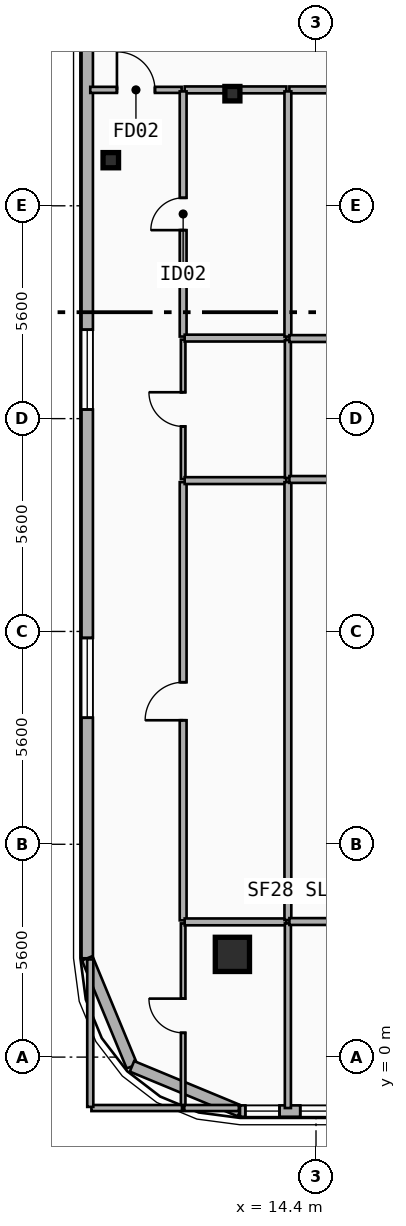
"""IFC4 building model, lengths in metres.
Left out: names, types, materials, properties, quantities, classifications, styles, units other than length and angle.
Written with IfcOpenShell. Run it as: python <this file> out.ifc"""

import sys

from ifc_helpers import new_model, si_unit, direction, frame, frame_2d, origin, origin_2d, place, context, subcontext, project, spatial, rectangle, i_section, extrude, element, fill, save


model = new_model("IFC4")
c1 = context("Model", 3, precision=1e-05, world=origin(), true_north=direction((0.0, 1.0)))
c2 = subcontext(c1, "Body", "Model", "MODEL_VIEW")
j1 = project(units=[si_unit("LENGTHUNIT", "METRE"), si_unit("PLANEANGLEUNIT", "RADIAN")], contexts=[c1])
p1 = place(None, origin())
s1 = spatial("IfcSite", under=j1, at=p1, CompositionType="ELEMENT")
p2 = place(p1, origin())
s2 = spatial("IfcBuilding", under=s1, at=p2, CompositionType="ELEMENT")
p3 = place(p2, frame((0.0, 0.0, 258.4)))
s3 = spatial("IfcBuildingStorey", under=s2, at=p3, CompositionType="ELEMENT", Elevation=258.4)
p4 = place(p3, frame((12.2, 25.35, 0.0), z_axis=(0.0, 0.0, 1.0), x_axis=(1.0, 0.0, 0.0)))
e1 = element("IfcColumn", 1, at=p4, inside=s3, PredefinedType="COLUMN", context=c2, shape_type="SweptSolid", body=[
    extrude(i_section(OverallWidth=0.395, OverallDepth=0.38, WebThickness=0.019, FlangeThickness=0.03, FilletRadius=0.015, at=origin_2d()), origin(), (0.0, 0.0, 1.0), 3.7),
])
p5 = place(p3, frame((12.2, 2.812, 0.0), z_axis=(0.0, -0.090221727315, 0.99592170371), x_axis=(1.0, 0.0, 0.0)))
e2 = element("IfcColumn", 2, at=p5, inside=s3, PredefinedType="COLUMN", context=c2, shape_type="SweptSolid", body=[
    extrude(rectangle(XDim=0.9, YDim=0.9, at=origin_2d()), origin(), (0.0, 0.0, 1.0), 3.715),
])
p6 = place(p3, frame((9.0, 23.6, 0.0), z_axis=(0.0, 0.0, 1.0), x_axis=(1.0, 0.0, 0.0)))
e3 = element("IfcColumn", 3, at=p6, inside=s3, PredefinedType="COLUMN", context=c2, shape_type="SweptSolid", body=[
    extrude(i_section(OverallWidth=0.408, OverallDepth=0.4, WebThickness=0.025, FlangeThickness=0.039, FilletRadius=0.015, at=origin_2d()), origin(), (0.0, 0.0, 1.0), 3.7),
])
p7 = place(p3, frame((8.38, 2.6, 0.0), z_axis=(0.0, 0.0, 1.0), x_axis=(0.0, 1.0, 0.0)))
e4 = element("IfcWall", 4, at=p7, inside=s3, PredefinedType="SOLIDWALL", context=c2, shape_type="SweptSolid", body=[
    extrude(rectangle(XDim=34.2, YDim=0.3, at=frame_2d((17.1, 0.0))), origin(), (0.0, 0.0, 1.0), 3.42),
])
p8 = place(p7, frame((6.33, 0.0, 0.75)))
e5 = element("IfcOpeningElement", 5, at=p8, cuts=e4, PredefinedType="OPENING", context=c2, shape_type="SweptSolid", body=[
    extrude(rectangle(XDim=2.1, YDim=2.1, at=frame_2d((1.05, 1.05))), frame((0.0, 0.16, 0.0), z_axis=(0.0, -1.0, 0.0), x_axis=(1.0, 0.0, 0.0)), (0.0, 0.0, 1.0), 0.32),
])
p9 = place(p7, frame((14.44, 0.0, 0.75)))
e6 = element("IfcOpeningElement", 6, at=p9, cuts=e4, PredefinedType="OPENING", context=c2, shape_type="SweptSolid", body=[
    extrude(rectangle(XDim=2.1, YDim=2.1, at=frame_2d((1.05, 1.05))), frame((0.0, 0.16, 0.0), z_axis=(0.0, -1.0, 0.0), x_axis=(1.0, 0.0, 0.0)), (0.0, 0.0, 1.0), 0.32),
])
p10 = place(p3, frame((9.557, -0.243, 0.0), z_axis=(0.0, 0.0, 1.0), x_axis=(-0.382676475685, 0.923882414032, 0.0)))
e7 = element("IfcWall", 7, at=p10, inside=s3, PredefinedType="SOLIDWALL", context=c2, shape_type="SweptSolid", body=[
    extrude(rectangle(XDim=3.077, YDim=0.3, at=frame_2d((1.539, 0.0))), origin(), (0.0, 0.0, 1.0), 3.42),
])
p11 = place(p3, frame((12.4, -1.42, 0.0), z_axis=(0.0, 0.0, 1.0), x_axis=(-0.92389884758, 0.382636798336, 0.0)))
e8 = element("IfcWall", 8, at=p11, inside=s3, PredefinedType="SOLIDWALL", context=c2, shape_type="SweptSolid", body=[
    extrude(rectangle(XDim=3.077, YDim=0.3, at=frame_2d((1.538, 0.0))), origin(), (0.0, 0.0, 1.0), 3.42),
])
p12 = place(p3, frame((45.2, -1.42, 0.0), z_axis=(0.0, 0.0, 1.0), x_axis=(-1.0, 0.0, 0.0)))
e9 = element("IfcWall", 9, at=p12, inside=s3, PredefinedType="SOLIDWALL", context=c2, shape_type="SweptSolid", body=[
    extrude(rectangle(XDim=32.8, YDim=0.3, at=frame_2d((16.4, 0.0))), origin(), (0.0, 0.0, 1.0), 3.42),
])
p13 = place(p12, frame((26.77, 0.0, 0.75)))
e10 = element("IfcOpeningElement", 10, at=p13, cuts=e9, PredefinedType="OPENING", context=c2, shape_type="SweptSolid", body=[
    extrude(rectangle(XDim=1.6, YDim=1.95, at=frame_2d((0.8, 0.975))), frame((0.0, 0.16, 0.0), z_axis=(0.0, -1.0, 0.0), x_axis=(1.0, 0.0, 0.0)), (0.0, 0.0, 1.0), 0.32),
])
p14 = place(p12, frame((29.115, 0.0, 0.75)))
e11 = element("IfcOpeningElement", 11, at=p14, cuts=e9, PredefinedType="OPENING", context=c2, shape_type="SweptSolid", body=[
    extrude(rectangle(XDim=2.1, YDim=2.1, at=frame_2d((1.05, 1.05))), frame((0.0, 0.16, 0.0), z_axis=(0.0, -1.0, 0.0), x_axis=(1.0, 0.0, 0.0)), (0.0, 0.0, 1.0), 0.32),
])
p15 = place(p12, frame((15.75, 0.0, 0.75)))
e12 = element("IfcOpeningElement", 12, at=p15, cuts=e9, PredefinedType="OPENING", context=c2, shape_type="SweptSolid", body=[
    extrude(rectangle(XDim=2.1, YDim=2.1, at=frame_2d((1.05, 1.05))), frame((0.0, 0.16, 0.0), z_axis=(0.0, -1.0, 0.0), x_axis=(1.0, 0.0, 0.0)), (0.0, 0.0, 1.0), 0.32),
])
p16 = place(p12, frame((4.681, 0.0, 0.8)))
e13 = element("IfcOpeningElement", 13, at=p16, cuts=e9, PredefinedType="OPENING", context=c2, shape_type="SweptSolid", body=[
    extrude(rectangle(XDim=1.8, YDim=1.8, at=frame_2d((0.9, 0.9))), frame((0.0, 0.16, 0.0), z_axis=(0.0, -1.0, 0.0), x_axis=(1.0, 0.0, 0.0)), (0.0, 0.0, 1.0), 0.32),
])
p17 = place(p12, frame((1.831, 0.0, 0.75)))
e14 = element("IfcOpeningElement", 14, at=p17, cuts=e9, PredefinedType="OPENING", context=c2, shape_type="SweptSolid", body=[
    extrude(rectangle(XDim=2.1, YDim=2.1, at=frame_2d((1.05, 1.05))), frame((0.0, 0.16, 0.0), z_axis=(0.0, -1.0, 0.0), x_axis=(1.0, 0.0, 0.0)), (0.0, 0.0, 1.0), 0.32),
])
p18 = place(p12, frame((0.2, 0.0, 0.9)))
e15 = element("IfcOpeningElement", 15, at=p18, cuts=e9, PredefinedType="OPENING", context=c2, shape_type="SweptSolid", body=[
    extrude(rectangle(XDim=0.9, YDim=1.05, at=frame_2d((0.45, 0.525))), frame((0.0, 0.16, 0.0), z_axis=(0.0, -1.0, 0.0), x_axis=(1.0, 0.0, 0.0)), (0.0, 0.0, 1.0), 0.32),
])
p19 = place(p12, frame((31.76, 0.0, 0.9)))
e16 = element("IfcOpeningElement", 16, at=p19, cuts=e9, PredefinedType="OPENING", context=c2, shape_type="SweptSolid", body=[
    extrude(rectangle(XDim=0.9, YDim=1.05, at=frame_2d((0.45, 0.525))), frame((0.0, 0.16, 0.0), z_axis=(0.0, -1.0, 0.0), x_axis=(1.0, 0.0, 0.0)), (0.0, 0.0, 1.0), 0.32),
])
p20 = place(p3, frame((8.46, 25.45, 0.0), z_axis=(0.0, 0.0, 1.0), x_axis=(1.0, 0.0, 0.0)))
e17 = element("IfcWall", 17, at=p20, inside=s3, PredefinedType="PARTITIONING", context=c2, shape_type="SweptSolid", body=[
    extrude(rectangle(XDim=2.404, YDim=0.16, at=frame_2d((1.202, 0.0))), origin(), (0.0, 0.0, 1.0), 3.42),
])
p21 = place(p20, frame((0.702, 0.0, 0.0)))
e18 = element("IfcOpeningElement", 18, at=p21, cuts=e17, PredefinedType="OPENING", context=c2, shape_type="SweptSolid", body=[
    extrude(rectangle(XDim=1.0, YDim=2.15, at=frame_2d((0.5, 1.075))), frame((0.0, 0.09, 0.0), z_axis=(0.0, -1.0, 0.0), x_axis=(1.0, 0.0, 0.0)), (0.0, 0.0, 1.0), 0.18),
])
p22 = place(p3, frame((10.944, 25.45, 0.0), z_axis=(0.0, 0.0, 1.0), x_axis=(1.0, 0.0, 0.0)))
e19 = element("IfcWall", 19, at=p22, inside=s3, PredefinedType="PLUMBINGWALL", context=c2, shape_type="SweptSolid", body=[
    extrude(rectangle(XDim=2.676, YDim=0.18, at=frame_2d((1.338, 0.0))), origin(), (0.0, 0.0, 1.0), 2.7),
])
p23 = place(p3, frame((13.7, 25.45, 0.0), z_axis=(0.0, 0.0, 1.0), x_axis=(1.0, 0.0, 0.0)))
e20 = element("IfcWall", 20, at=p23, inside=s3, PredefinedType="PLUMBINGWALL", context=c2, shape_type="SweptSolid", body=[
    extrude(rectangle(XDim=2.671, YDim=0.18, at=frame_2d((1.335, 0.0))), origin(), (0.0, 0.0, 1.0), 3.42),
])
p24 = place(p3, frame((10.904, -1.34, 0.0), z_axis=(0.0, 0.0, 1.0), x_axis=(0.0, 1.0, 0.0)))
e21 = element("IfcWall", 21, at=p24, inside=s3, PredefinedType="PARTITIONING", context=c2, shape_type="SweptSolid", body=[
    extrude(rectangle(XDim=4.858, YDim=0.12, at=frame_2d((2.429, 0.0))), origin(), (0.0, 0.0, 1.0), 3.42),
])
p25 = place(p24, frame((1.979, 0.0, 0.0)))
e22 = element("IfcOpeningElement", 22, at=p25, cuts=e21, PredefinedType="OPENING", context=c2, shape_type="SweptSolid", body=[
    extrude(rectangle(XDim=0.9, YDim=2.1, at=frame_2d((0.45, 1.05))), frame((0.0, 0.07, 0.0), z_axis=(0.0, -1.0, 0.0), x_axis=(1.0, 0.0, 0.0)), (0.0, 0.0, 1.0), 0.14),
])
p26 = place(p3, frame((10.904, 3.598, 0.0), z_axis=(0.0, 0.0, 1.0), x_axis=(0.0, 1.0, 0.0)))
e23 = element("IfcWall", 23, at=p26, inside=s3, PredefinedType="PLUMBINGWALL", context=c2, shape_type="SweptSolid", body=[
    extrude(rectangle(XDim=11.531, YDim=0.18, at=frame_2d((5.766, 0.0))), origin(), (0.0, 0.0, 1.0), 3.42),
])
p27 = place(p26, frame((5.265, 0.0, 0.0)))
e24 = element("IfcOpeningElement", 24, at=p27, cuts=e23, PredefinedType="OPENING", context=c2, shape_type="SweptSolid", body=[
    extrude(rectangle(XDim=1.0, YDim=2.15, at=frame_2d((0.5, 1.075))), frame((0.0, 0.1, 0.0), z_axis=(0.0, -1.0, 0.0), x_axis=(1.0, 0.0, 0.0)), (0.0, 0.0, 1.0), 0.2),
])
p28 = place(p3, frame((10.904, 15.209, 0.0), z_axis=(0.0, 0.0, 1.0), x_axis=(0.0, 1.0, 0.0)))
e25 = element("IfcWall", 25, at=p28, inside=s3, PredefinedType="PARTITIONING", context=c2, shape_type="SweptSolid", body=[
    extrude(rectangle(XDim=3.67, YDim=0.12, at=frame_2d((1.835, 0.0))), origin(), (0.0, 0.0, 1.0), 3.42),
])
p29 = place(p28, frame((1.385, 0.0, 0.0)))
e26 = element("IfcOpeningElement", 26, at=p29, cuts=e25, PredefinedType="OPENING", context=c2, shape_type="SweptSolid", body=[
    extrude(rectangle(XDim=0.9, YDim=2.1, at=frame_2d((0.45, 1.05))), frame((0.0, 0.07, 0.0), z_axis=(0.0, -1.0, 0.0), x_axis=(1.0, 0.0, 0.0)), (0.0, 0.0, 1.0), 0.14),
])
p30 = place(p3, frame((10.904, 18.959, 0.0), z_axis=(0.0, 0.0, 1.0), x_axis=(0.0, 1.0, 0.0)))
e27 = element("IfcWall", 27, at=p30, inside=s3, PredefinedType="PLUMBINGWALL", context=c2, shape_type="SweptSolid", body=[
    extrude(rectangle(XDim=6.451, YDim=0.18, at=frame_2d((3.226, 0.0))), origin(), (0.0, 0.0, 1.0), 2.9),
])
p31 = place(p30, frame((2.801, 0.0, 0.0)))
e28 = element("IfcOpeningElement", 28, at=p31, cuts=e27, PredefinedType="OPENING", context=c2, shape_type="SweptSolid", body=[
    extrude(rectangle(XDim=0.85, YDim=2.1, at=frame_2d((0.425, 1.05))), frame((0.0, 0.1, 0.0), z_axis=(0.0, -1.0, 0.0), x_axis=(1.0, 0.0, 0.0)), (0.0, 0.0, 1.0), 0.2),
])
p32 = place(p3, frame((10.944, 3.558, 0.0), z_axis=(0.0, 0.0, 1.0), x_axis=(1.0, 0.0, 0.0)))
e29 = element("IfcWall", 29, at=p32, inside=s3, PredefinedType="PLUMBINGWALL", context=c2, shape_type="SweptSolid", body=[
    extrude(rectangle(XDim=2.676, YDim=0.18, at=frame_2d((1.338, 0.0))), origin(), (0.0, 0.0, 1.0), 2.7),
])
p33 = place(p3, frame((13.66, -1.34, 0.0), z_axis=(0.0, 0.0, 1.0), x_axis=(0.0, 1.0, 0.0)))
e30 = element("IfcWall", 30, at=p33, inside=s3, PredefinedType="PARTITIONING", context=c2, shape_type="SweptSolid", body=[
    extrude(rectangle(XDim=4.858, YDim=0.16, at=frame_2d((2.429, 0.0))), origin(), (0.0, 0.0, 1.0), 3.08),
])
p34 = place(p3, frame((10.944, 15.169, 0.0), z_axis=(0.0, 0.0, 1.0), x_axis=(1.0, 0.0, 0.0)))
e31 = element("IfcWall", 31, at=p34, inside=s3, PredefinedType="PLUMBINGWALL", context=c2, shape_type="SweptSolid", body=[
    extrude(rectangle(XDim=2.676, YDim=0.18, at=frame_2d((1.338, 0.0))), origin(), (0.0, 0.0, 1.0), 2.7),
])
p35 = place(p3, frame((13.66, 3.607, 0.0), z_axis=(0.0, 0.0, 1.0), x_axis=(0.0, 1.0, 0.0)))
e32 = element("IfcWall", 32, at=p35, inside=s3, PredefinedType="PLUMBINGWALL", context=c2, shape_type="SweptSolid", body=[
    extrude(rectangle(XDim=11.522, YDim=0.18, at=frame_2d((5.761, 0.0))), origin(), (0.0, 0.0, 1.0), 2.95),
])
p36 = place(p3, frame((10.944, 18.919, 0.0), z_axis=(0.0, 0.0, 1.0), x_axis=(1.0, 0.0, 0.0)))
e33 = element("IfcWall", 33, at=p36, inside=s3, PredefinedType="PLUMBINGWALL", context=c2, shape_type="SweptSolid", body=[
    extrude(rectangle(XDim=2.676, YDim=0.18, at=frame_2d((1.338, 0.0))), origin(), (0.0, 0.0, 1.0), 2.7),
])
p37 = place(p3, frame((13.66, 15.239, 0.0), z_axis=(0.0, 0.0, 1.0), x_axis=(0.0, 1.0, 0.0)))
e34 = element("IfcWall", 34, at=p37, inside=s3, PredefinedType="PARTITIONING", context=c2, shape_type="SweptSolid", body=[
    extrude(rectangle(XDim=3.628, YDim=0.16, at=frame_2d((1.814, 0.0))), origin(), (0.0, 0.0, 1.0), 2.95),
])
p38 = place(p3, frame((13.66, 18.959, 0.0), z_axis=(0.0, 0.0, 1.0), x_axis=(0.0, 1.0, 0.0)))
e35 = element("IfcWall", 35, at=p38, inside=s3, PredefinedType="PLUMBINGWALL", context=c2, shape_type="SweptSolid", body=[
    extrude(rectangle(XDim=6.451, YDim=0.18, at=frame_2d((3.226, 0.0))), origin(), (0.0, 0.0, 1.0), 2.95),
])
p39 = place(p3, frame((13.7, 3.567, 0.0), z_axis=(0.0, 0.0, 1.0), x_axis=(1.0, 0.0, 0.0)))
e36 = element("IfcWall", 36, at=p39, inside=s3, PredefinedType="PLUMBINGWALL", context=c2, shape_type="SweptSolid", body=[
    extrude(rectangle(XDim=2.671, YDim=0.18, at=frame_2d((1.335, 0.0))), origin(), (0.0, 0.0, 1.0), 3.42),
])
p40 = place(p3, frame((13.7, 15.199, 0.0), z_axis=(0.0, 0.0, 1.0), x_axis=(1.0, 0.0, 0.0)))
e37 = element("IfcWall", 37, at=p40, inside=s3, PredefinedType="PLUMBINGWALL", context=c2, shape_type="SweptSolid", body=[
    extrude(rectangle(XDim=2.671, YDim=0.18, at=frame_2d((1.335, 0.0))), origin(), (0.0, 0.0, 1.0), 2.95),
])
p41 = place(p3, frame((13.7, 18.907, 0.0), z_axis=(0.0, 0.0, 1.0), x_axis=(1.0, 0.0, 0.0)))
e38 = element("IfcWall", 38, at=p41, inside=s3, PredefinedType="PLUMBINGWALL", context=c2, shape_type="SweptSolid", body=[
    extrude(rectangle(XDim=2.671, YDim=0.18, at=frame_2d((1.335, 0.0))), origin(), (0.0, 0.0, 1.0), 2.96),
])
p42 = place(p3, frame((8.49, -1.34, 0.0), z_axis=(0.0, 0.0, 1.0), x_axis=(1.0, 0.0, 0.0)))
e39 = element("IfcWall", 39, at=p42, inside=s3, PredefinedType="PARTITIONING", context=c2, shape_type="SweptSolid", body=[
    extrude(rectangle(XDim=2.384, YDim=0.16, at=frame_2d((1.192, 0.0))), origin(), (0.0, 0.0, 1.0), 3.42),
])
p43 = place(p3, frame((8.46, -1.31, 0.0), z_axis=(0.0, 0.0, 1.0), x_axis=(0.0, 1.0, 0.0)))
e40 = element("IfcWall", 40, at=p43, inside=s3, PredefinedType="PARTITIONING", context=c2, shape_type="SweptSolid", body=[
    extrude(rectangle(XDim=3.88, YDim=0.16, at=frame_2d((1.94, 0.0))), origin(), (0.0, 0.0, 1.0), 3.42),
])
p44 = place(p3, frame((10.934, -1.34, 0.0), z_axis=(0.0, 0.0, 1.0), x_axis=(1.0, 0.0, 0.0)))
e41 = element("IfcWall", 41, at=p44, inside=s3, PredefinedType="PARTITIONING", context=c2, shape_type="SweptSolid", body=[
    extrude(rectangle(XDim=1.436, YDim=0.16, at=frame_2d((0.718, 0.0))), origin(), (0.0, 0.0, 1.0), 3.42),
])
p45 = place(p8, origin())
e42 = element("IfcWindow", 42, at=p45, inside=s3, PartitioningType="SINGLE_PANEL", PredefinedType="WINDOW", context=c2, shape_type="SweptSolid", body=[
    extrude(rectangle(XDim=2.1, YDim=2.1, at=frame_2d((1.05, 1.05))), frame((0.0, 0.03, 0.0), z_axis=(0.0, -1.0, 0.0), x_axis=(1.0, 0.0, 0.0)), (0.0, 0.0, 1.0), 0.06),
])
fill(e5, e42)
p46 = place(p9, origin())
e43 = element("IfcWindow", 43, at=p46, inside=s3, PartitioningType="SINGLE_PANEL", PredefinedType="WINDOW", context=c2, shape_type="SweptSolid", body=[
    extrude(rectangle(XDim=2.1, YDim=2.1, at=frame_2d((1.05, 1.05))), frame((0.0, 0.03, 0.0), z_axis=(0.0, -1.0, 0.0), x_axis=(1.0, 0.0, 0.0)), (0.0, 0.0, 1.0), 0.06),
])
fill(e6, e43)
p47 = place(p14, origin())
e44 = element("IfcWindow", 44, at=p47, inside=s3, PartitioningType="SINGLE_PANEL", PredefinedType="WINDOW", context=c2, shape_type="SweptSolid", body=[
    extrude(rectangle(XDim=2.1, YDim=2.1, at=frame_2d((1.05, 1.05))), frame((0.0, 0.03, 0.0), z_axis=(0.0, -1.0, 0.0), x_axis=(1.0, 0.0, 0.0)), (0.0, 0.0, 1.0), 0.06),
])
fill(e11, e44)
p48 = place(p19, origin())
e45 = element("IfcWindow", 45, at=p48, inside=s3, PartitioningType="SINGLE_PANEL", PredefinedType="WINDOW", context=c2, shape_type="SweptSolid", body=[
    extrude(rectangle(XDim=0.9, YDim=1.05, at=frame_2d((0.45, 0.525))), frame((0.0, 0.03, 0.0), z_axis=(0.0, -1.0, 0.0), x_axis=(1.0, 0.0, 0.0)), (0.0, 0.0, 1.0), 0.06),
])
fill(e16, e45)
p49 = place(p21, origin())
e46 = element("IfcDoor", 46, at=p49, inside=s3, OperationType="SINGLE_SWING_LEFT", PredefinedType="DOOR", context=c2, shape_type="SweptSolid", body=[
    extrude(rectangle(XDim=1.0, YDim=2.15, at=frame_2d((0.5, 1.075))), frame((0.0, 0.025, 0.0), z_axis=(0.0, -1.0, 0.0), x_axis=(1.0, 0.0, 0.0)), (0.0, 0.0, 1.0), 0.05),
])
fill(e18, e46)
p50 = place(p25, origin())
e47 = element("IfcDoor", 47, at=p50, inside=s3, OperationType="SINGLE_SWING_RIGHT", PredefinedType="DOOR", context=c2, shape_type="SweptSolid", body=[
    extrude(rectangle(XDim=0.9, YDim=2.1, at=frame_2d((0.45, 1.05))), frame((0.0, 0.025, 0.0), z_axis=(0.0, -1.0, 0.0), x_axis=(1.0, 0.0, 0.0)), (0.0, 0.0, 1.0), 0.05),
])
fill(e22, e47)
p51 = place(p27, origin())
e48 = element("IfcDoor", 48, at=p51, inside=s3, OperationType="SINGLE_SWING_LEFT", PredefinedType="DOOR", context=c2, shape_type="SweptSolid", body=[
    extrude(rectangle(XDim=1.0, YDim=2.15, at=frame_2d((0.5, 1.075))), frame((0.0, 0.025, 0.0), z_axis=(0.0, -1.0, 0.0), x_axis=(1.0, 0.0, 0.0)), (0.0, 0.0, 1.0), 0.05),
])
fill(e24, e48)
p52 = place(p29, origin())
e49 = element("IfcDoor", 49, at=p52, inside=s3, OperationType="SINGLE_SWING_RIGHT", PredefinedType="DOOR", context=c2, shape_type="SweptSolid", body=[
    extrude(rectangle(XDim=0.9, YDim=2.1, at=frame_2d((0.45, 1.05))), frame((0.0, 0.025, 0.0), z_axis=(0.0, -1.0, 0.0), x_axis=(1.0, 0.0, 0.0)), (0.0, 0.0, 1.0), 0.05),
])
fill(e26, e49)
p53 = place(p31, origin())
e50 = element("IfcDoor", 50, at=p53, inside=s3, OperationType="SINGLE_SWING_LEFT", PredefinedType="DOOR", context=c2, shape_type="SweptSolid", body=[
    extrude(rectangle(XDim=0.85, YDim=2.1, at=frame_2d((0.425, 1.05))), frame((0.0, 0.025, 0.0), z_axis=(0.0, -1.0, 0.0), x_axis=(1.0, 0.0, 0.0)), (0.0, 0.0, 1.0), 0.05),
])
fill(e28, e50)
save(model, sys.argv[1])
